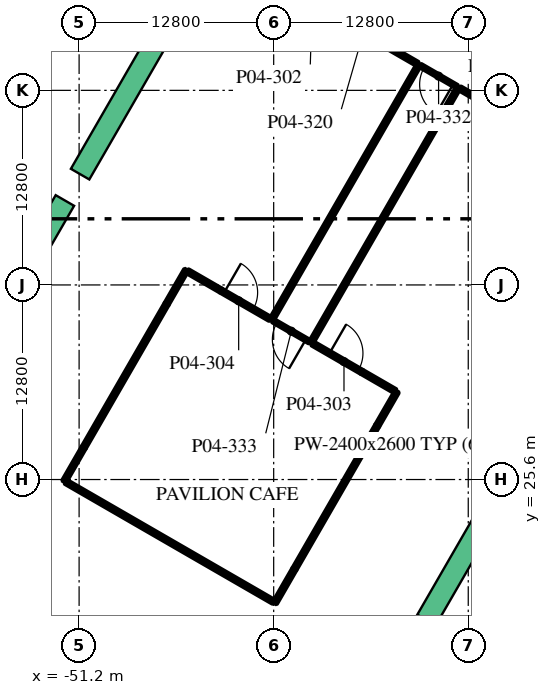
"""IFC4 building model, lengths in metres.
Left out: names, types, materials, properties, quantities, classifications, styles, units other than length and angle.
Written with IfcOpenShell. Run it as: python <this file> out.ifc"""

import sys

from ifc_helpers import new_model, si_unit, direction, frame, frame_2d, origin, place, context, subcontext, project, spatial, rectangle, extrude, element, fill, save


model = new_model("IFC4")
c1 = context("Model", 3, precision=1e-05, world=origin(), true_north=direction((0.0, 1.0)))
c2 = subcontext(c1, "Body", "Model", "MODEL_VIEW")
j1 = project(units=[si_unit("LENGTHUNIT", "METRE"), si_unit("PLANEANGLEUNIT", "RADIAN")], contexts=[c1])
p1 = place(None, origin())
s1 = spatial("IfcSite", under=j1, at=p1, CompositionType="ELEMENT")
p2 = place(p1, origin())
s2 = spatial("IfcBuilding", under=s1, at=p2, CompositionType="ELEMENT")
p3 = place(p2, frame((0.0, 0.0, 21.6)))
s3 = spatial("IfcBuildingStorey", under=s2, at=p3, CompositionType="ELEMENT", Elevation=21.6)
p4 = place(p3, frame((-6.875, 40.198, 0.0), z_axis=(0.0, 0.0, 1.0), x_axis=(-0.500000527961, -0.866025098966, 0.0)))
e1 = element("IfcWall", 1, at=p4, inside=s3, PredefinedType="SOLIDWALL", context=c2, shape_type="SweptSolid", body=[
    extrude(rectangle(XDim=62.75, YDim=0.25, at=frame_2d((31.375, 0.0))), origin(), (0.0, 0.0, 1.0), 4.5),
])
p5 = place(p3, frame((-30.311, 31.356, 0.0), z_axis=(0.0, 0.0, 1.0), x_axis=(-0.499990435942, -0.866030925526, 0.0)))
e2 = element("IfcWall", 2, at=p5, inside=s3, PredefinedType="SOLIDWALL", context=c2, shape_type="SweptSolid", body=[
    extrude(rectangle(XDim=2.55, YDim=0.25, at=frame_2d((1.275, 0.0))), origin(), (0.0, 0.0, 1.0), 4.5),
])
p6 = place(p3, frame((-31.586, 29.148, 0.0), z_axis=(0.0, 0.0, 1.0), x_axis=(-0.499995831264, -0.866027810592, 0.0)))
e3 = element("IfcWall", 3, at=p6, inside=s3, PredefinedType="SOLIDWALL", context=c2, shape_type="SweptSolid", body=[
    extrude(rectangle(XDim=10.9, YDim=0.25, at=frame_2d((5.45, 0.0))), origin(), (0.0, 0.0, 1.0), 4.5),
])
p7 = place(p6, frame((0.25, 0.0, 0.5)))
e4 = element("IfcOpeningElement", 4, at=p7, cuts=e3, PredefinedType="OPENING", context=c2, shape_type="SweptSolid", body=[
    extrude(rectangle(XDim=2.4, YDim=2.6, at=frame_2d((1.2, 1.3))), frame((0.0, 0.135, 0.0), z_axis=(0.0, -1.0, 0.0), x_axis=(1.0, 0.0, 0.0)), (0.0, 0.0, 1.0), 0.27),
])
p8 = place(p6, frame((4.25, 0.0, 0.5)))
e5 = element("IfcOpeningElement", 5, at=p8, cuts=e3, PredefinedType="OPENING", context=c2, shape_type="SweptSolid", body=[
    extrude(rectangle(XDim=2.4, YDim=2.6, at=frame_2d((1.2, 1.3))), frame((0.0, 0.135, 0.0), z_axis=(0.0, -1.0, 0.0), x_axis=(1.0, 0.0, 0.0)), (0.0, 0.0, 1.0), 0.27),
])
p9 = place(p6, frame((8.25, 0.0, 0.5)))
e6 = element("IfcOpeningElement", 6, at=p9, cuts=e3, PredefinedType="OPENING", context=c2, shape_type="SweptSolid", body=[
    extrude(rectangle(XDim=2.4, YDim=2.6, at=frame_2d((1.2, 1.3))), frame((0.0, 0.135, 0.0), z_axis=(0.0, -1.0, 0.0), x_axis=(1.0, 0.0, 0.0)), (0.0, 0.0, 1.0), 0.27),
])
p10 = place(p3, frame((-37.036, 19.708, 0.0), z_axis=(0.0, 0.0, 1.0), x_axis=(-0.500062241894, -0.865989465428, 0.0)))
e7 = element("IfcWall", 7, at=p10, inside=s3, PredefinedType="SOLIDWALL", context=c2, shape_type="SweptSolid", body=[
    extrude(rectangle(XDim=2.55, YDim=0.25, at=frame_2d((1.275, 0.0))), origin(), (0.0, 0.0, 1.0), 4.5),
])
for number, where, z_axis, x_axis in (
    (8, (-26.252, 51.385, 0.0), (0.0, 0.0, 1.0), (-0.5, -0.866, 0.0)),
    (9, (-38.538, 36.106, 0.0), (0.0, 0.0, 1.0), (0.5, 0.866, 0.0)),
):
    element("IfcWall", number, at=place(p3, frame(where, z_axis=z_axis, x_axis=x_axis)), inside=s3, PredefinedType="SOLIDWALL", context=c2, shape_type="SweptSolid", body=[
        extrude(rectangle(XDim=19.375, YDim=0.25, at=frame_2d((9.688, 0.0))), origin(), (0.0, 0.0, 1.0), 4.5),
    ])
p11 = place(p3, frame((-45.442, 37.148, 0.0), z_axis=(0.0, 0.0, 1.0), x_axis=(0.500062241894, 0.865989465428, 0.0)))
e10 = element("IfcWall", 10, at=p11, inside=s3, PredefinedType="SOLIDWALL", context=c2, shape_type="SweptSolid", body=[
    extrude(rectangle(XDim=2.55, YDim=0.25, at=frame_2d((1.275, 0.0))), origin(), (0.0, 0.0, 1.0), 4.5),
])
p12 = place(p3, frame((-50.892, 27.708, 0.0), z_axis=(0.0, 0.0, 1.0), x_axis=(0.499995831264, 0.866027810592, 0.0)))
e11 = element("IfcWall", 11, at=p12, inside=s3, PredefinedType="SOLIDWALL", context=c2, shape_type="SweptSolid", body=[
    extrude(rectangle(XDim=10.9, YDim=0.25, at=frame_2d((5.45, 0.0))), origin(), (0.0, 0.0, 1.0), 4.5),
])
p13 = place(p12, frame((8.25, 0.0, 0.5)))
e12 = element("IfcOpeningElement", 12, at=p13, cuts=e11, PredefinedType="OPENING", context=c2, shape_type="SweptSolid", body=[
    extrude(rectangle(XDim=2.4, YDim=2.6, at=frame_2d((1.2, 1.3))), frame((0.0, 0.135, 0.0), z_axis=(0.0, -1.0, 0.0), x_axis=(1.0, 0.0, 0.0)), (0.0, 0.0, 1.0), 0.27),
])
p14 = place(p12, frame((4.25, 0.0, 0.5)))
e13 = element("IfcOpeningElement", 13, at=p14, cuts=e11, PredefinedType="OPENING", context=c2, shape_type="SweptSolid", body=[
    extrude(rectangle(XDim=2.4, YDim=2.6, at=frame_2d((1.2, 1.3))), frame((0.0, 0.135, 0.0), z_axis=(0.0, -1.0, 0.0), x_axis=(1.0, 0.0, 0.0)), (0.0, 0.0, 1.0), 0.27),
])
p15 = place(p12, frame((0.25, 0.0, 0.5)))
e14 = element("IfcOpeningElement", 14, at=p15, cuts=e11, PredefinedType="OPENING", context=c2, shape_type="SweptSolid", body=[
    extrude(rectangle(XDim=2.4, YDim=2.6, at=frame_2d((1.2, 1.3))), frame((0.0, 0.135, 0.0), z_axis=(0.0, -1.0, 0.0), x_axis=(1.0, 0.0, 0.0)), (0.0, 0.0, 1.0), 0.27),
])
p16 = place(p3, frame((-52.167, 25.5, 0.0), z_axis=(0.0, 0.0, 1.0), x_axis=(0.499990435942, 0.866030925526, 0.0)))
e15 = element("IfcWall", 15, at=p16, inside=s3, PredefinedType="SOLIDWALL", context=c2, shape_type="SweptSolid", body=[
    extrude(rectangle(XDim=2.55, YDim=0.25, at=frame_2d((1.275, 0.0))), origin(), (0.0, 0.0, 1.0), 4.5),
])
p17 = place(p3, frame((-79.603, 9.73, 0.0), z_axis=(0.0, 0.0, 1.0), x_axis=(0.500000527961, 0.866025098966, 0.0)))
e16 = element("IfcWall", 16, at=p17, inside=s3, PredefinedType="SOLIDWALL", context=c2, shape_type="SweptSolid", body=[
    extrude(rectangle(XDim=62.75, YDim=0.25, at=frame_2d((31.375, 0.0))), origin(), (0.0, 0.0, 1.0), 4.5),
])
for number, where, z_axis, x_axis in (
    (17, (-26.144, 51.323, 0.0), (0.0, 0.0, 1.0), (0.866, -0.5, 0.0)),
    (18, (-34.696, 56.26, 0.0), (0.0, 0.0, 1.0), (0.866, -0.5, 0.0)),
):
    element("IfcWall", number, at=place(p3, frame(where, z_axis=z_axis, x_axis=x_axis)), inside=s3, PredefinedType="SOLIDWALL", context=c2, shape_type="SweptSolid", body=[
        extrude(rectangle(XDim=6.625, YDim=0.25, at=frame_2d((3.312, 0.0))), origin(), (0.0, 0.0, 1.0), 4.5),
    ])
p18 = place(p3, frame((-32.606, 32.681, 0.0), z_axis=(0.0, 0.0, 1.0), x_axis=(0.865997200291, -0.500048846702, 0.0)))
e19 = element("IfcWall", 19, at=p18, inside=s3, PredefinedType="SOLIDWALL", context=c2, shape_type="SweptSolid", body=[
    extrude(rectangle(XDim=2.525, YDim=0.25, at=frame_2d((1.263, 0.0))), origin(), (0.0, 0.0, 1.0), 4.5),
])
p19 = place(p3, frame((-35.832, 34.544, 0.0), z_axis=(0.0, 0.0, 1.0), x_axis=(0.866040420308, -0.499973989716, 0.0)))
e20 = element("IfcWall", 20, at=p19, inside=s3, PredefinedType="SOLIDWALL", context=c2, shape_type="SweptSolid", body=[
    extrude(rectangle(XDim=3.725, YDim=0.25, at=frame_2d((1.862, 0.0))), origin(), (0.0, 0.0, 1.0), 4.5),
])
p20 = place(p19, frame((1.275, 0.0, 0.0)))
e21 = element("IfcOpeningElement", 21, at=p20, cuts=e20, PredefinedType="OPENING", context=c2, shape_type="SweptSolid", body=[
    extrude(rectangle(XDim=2.2, YDim=2.1, at=frame_2d((1.1, 1.05))), frame((0.0, 0.135, 0.0), z_axis=(0.0, -1.0, 0.0), x_axis=(1.0, 0.0, 0.0)), (0.0, 0.0, 1.0), 0.27),
])
p21 = place(p3, frame((-41.872, 38.031, 0.0), z_axis=(0.0, 0.0, 1.0), x_axis=(0.866012039196, -0.500023147432, 0.0)))
e22 = element("IfcWall", 22, at=p21, inside=s3, PredefinedType="SOLIDWALL", context=c2, shape_type="SweptSolid", body=[
    extrude(rectangle(XDim=3.725, YDim=0.25, at=frame_2d((1.862, 0.0))), origin(), (0.0, 0.0, 1.0), 4.5),
])
p22 = place(p21, frame((0.25, 0.0, 0.0)))
e23 = element("IfcOpeningElement", 23, at=p22, cuts=e22, PredefinedType="OPENING", context=c2, shape_type="SweptSolid", body=[
    extrude(rectangle(XDim=2.2, YDim=2.1, at=frame_2d((1.1, 1.05))), frame((0.0, 0.135, 0.0), z_axis=(0.0, -1.0, 0.0), x_axis=(1.0, 0.0, 0.0)), (0.0, 0.0, 1.0), 0.27),
])
p23 = place(p3, frame((-44.059, 39.294, 0.0), z_axis=(0.0, 0.0, 1.0), x_axis=(0.866039067339, -0.499976333282, 0.0)))
e24 = element("IfcWall", 24, at=p23, inside=s3, PredefinedType="SOLIDWALL", context=c2, shape_type="SweptSolid", body=[
    extrude(rectangle(XDim=2.525, YDim=0.25, at=frame_2d((1.262, 0.0))), origin(), (0.0, 0.0, 1.0), 4.5),
])
p24 = place(p3, frame((-38.419, 17.562, 0.0), z_axis=(0.0, 0.0, 1.0), x_axis=(-0.866025284237, 0.500000207062, 0.0)))
e25 = element("IfcWall", 25, at=p24, inside=s3, PredefinedType="SOLIDWALL", context=c2, shape_type="SweptSolid", body=[
    extrude(rectangle(XDim=15.75, YDim=0.25, at=frame_2d((7.875, 0.0))), origin(), (0.0, 0.0, 1.0), 4.5),
])
p25 = place(p3, frame((-26.361, 51.448, 0.0), z_axis=(0.0, 0.0, 1.0), x_axis=(-0.866027397988, 0.499996545922, 0.0)))
e26 = element("IfcWall", 26, at=p25, inside=s3, PredefinedType="PARTITIONING", context=c2, shape_type="SweptSolid", body=[
    extrude(rectangle(XDim=2.75, YDim=0.2, at=frame_2d((1.375, 0.0))), origin(), (0.0, 0.0, 1.0), 4.5),
])
p26 = place(p25, frame((0.275, 0.0, 0.0)))
e27 = element("IfcOpeningElement", 27, at=p26, cuts=e26, PredefinedType="OPENING", context=c2, shape_type="SweptSolid", body=[
    extrude(rectangle(XDim=2.2, YDim=2.1, at=frame_2d((1.1, 1.05))), frame((0.0, 0.11, 0.0), z_axis=(0.0, -1.0, 0.0), x_axis=(1.0, 0.0, 0.0)), (0.0, 0.0, 1.0), 0.22),
])
p27 = place(p3, frame((-36.048, 34.669, 0.0), z_axis=(0.0, 0.0, 1.0), x_axis=(-0.866027397988, 0.499996545922, 0.0)))
e28 = element("IfcWall", 28, at=p27, inside=s3, PredefinedType="PARTITIONING", context=c2, shape_type="SweptSolid", body=[
    extrude(rectangle(XDim=2.75, YDim=0.2, at=frame_2d((1.375, 0.0))), origin(), (0.0, 0.0, 1.0), 4.5),
])
p28 = place(p27, frame((0.275, 0.0, 0.0)))
e29 = element("IfcOpeningElement", 29, at=p28, cuts=e28, PredefinedType="OPENING", context=c2, shape_type="SweptSolid", body=[
    extrude(rectangle(XDim=2.2, YDim=2.1, at=frame_2d((1.1, 1.05))), frame((0.0, 0.11, 0.0), z_axis=(0.0, -1.0, 0.0), x_axis=(1.0, 0.0, 0.0)), (0.0, 0.0, 1.0), 0.22),
])
for number, where, z_axis, x_axis in (
    (30, (-22.343, 26.756, 0.0), (0.0, 0.0, 1.0), (-0.5, -0.866, 0.0)),
    (31, (-45.135, 56.081, 0.0), (0.0, 0.0, 1.0), (-0.5, -0.866, 0.0)),
    (32, (-52.135, 43.956, 0.0), (0.0, 0.0, 1.0), (-0.5, -0.866, 0.0)),
):
    element("IfcWall", number, at=place(p3, frame(where, z_axis=z_axis, x_axis=x_axis)), inside=s3, PredefinedType="SOLIDWALL", context=c2, shape_type="SweptSolid", body=[
        extrude(rectangle(XDim=12.0, YDim=1.4, at=frame_2d((6.0, 0.0))), origin(), (0.0, 0.0, 1.0), 0.9),
    ])
p29 = place(p7, origin())
e33 = element("IfcWindow", 33, at=p29, inside=s3, PartitioningType="SINGLE_PANEL", PredefinedType="WINDOW", context=c2, shape_type="SweptSolid", body=[
    extrude(rectangle(XDim=2.4, YDim=2.6, at=frame_2d((1.2, 1.3))), frame((0.0, 0.03, 0.0), z_axis=(0.0, -1.0, 0.0), x_axis=(1.0, 0.0, 0.0)), (0.0, 0.0, 1.0), 0.06),
])
fill(e4, e33)
p30 = place(p8, origin())
e34 = element("IfcWindow", 34, at=p30, inside=s3, PartitioningType="SINGLE_PANEL", PredefinedType="WINDOW", context=c2, shape_type="SweptSolid", body=[
    extrude(rectangle(XDim=2.4, YDim=2.6, at=frame_2d((1.2, 1.3))), frame((0.0, 0.03, 0.0), z_axis=(0.0, -1.0, 0.0), x_axis=(1.0, 0.0, 0.0)), (0.0, 0.0, 1.0), 0.06),
])
fill(e5, e34)
p31 = place(p9, origin())
e35 = element("IfcWindow", 35, at=p31, inside=s3, PartitioningType="SINGLE_PANEL", PredefinedType="WINDOW", context=c2, shape_type="SweptSolid", body=[
    extrude(rectangle(XDim=2.4, YDim=2.6, at=frame_2d((1.2, 1.3))), frame((0.0, 0.03, 0.0), z_axis=(0.0, -1.0, 0.0), x_axis=(1.0, 0.0, 0.0)), (0.0, 0.0, 1.0), 0.06),
])
fill(e6, e35)
p32 = place(p13, origin())
e36 = element("IfcWindow", 36, at=p32, inside=s3, PartitioningType="SINGLE_PANEL", PredefinedType="WINDOW", context=c2, shape_type="SweptSolid", body=[
    extrude(rectangle(XDim=2.4, YDim=2.6, at=frame_2d((1.2, 1.3))), frame((0.0, 0.03, 0.0), z_axis=(0.0, -1.0, 0.0), x_axis=(1.0, 0.0, 0.0)), (0.0, 0.0, 1.0), 0.06),
])
fill(e12, e36)
p33 = place(p14, origin())
e37 = element("IfcWindow", 37, at=p33, inside=s3, PartitioningType="SINGLE_PANEL", PredefinedType="WINDOW", context=c2, shape_type="SweptSolid", body=[
    extrude(rectangle(XDim=2.4, YDim=2.6, at=frame_2d((1.2, 1.3))), frame((0.0, 0.03, 0.0), z_axis=(0.0, -1.0, 0.0), x_axis=(1.0, 0.0, 0.0)), (0.0, 0.0, 1.0), 0.06),
])
fill(e13, e37)
p34 = place(p15, origin())
e38 = element("IfcWindow", 38, at=p34, inside=s3, PartitioningType="SINGLE_PANEL", PredefinedType="WINDOW", context=c2, shape_type="SweptSolid", body=[
    extrude(rectangle(XDim=2.4, YDim=2.6, at=frame_2d((1.2, 1.3))), frame((0.0, 0.03, 0.0), z_axis=(0.0, -1.0, 0.0), x_axis=(1.0, 0.0, 0.0)), (0.0, 0.0, 1.0), 0.06),
])
fill(e14, e38)
p35 = place(p20, origin())
e39 = element("IfcDoor", 39, at=p35, inside=s3, OperationType="DOUBLE_DOOR_SINGLE_SWING", PredefinedType="DOOR", context=c2, shape_type="SweptSolid", body=[
    extrude(rectangle(XDim=2.2, YDim=2.1, at=frame_2d((1.1, 1.05))), frame((0.0, 0.025, 0.0), z_axis=(0.0, -1.0, 0.0), x_axis=(1.0, 0.0, 0.0)), (0.0, 0.0, 1.0), 0.05),
])
fill(e21, e39)
p36 = place(p22, origin())
e40 = element("IfcDoor", 40, at=p36, inside=s3, OperationType="DOUBLE_DOOR_SINGLE_SWING", PredefinedType="DOOR", context=c2, shape_type="SweptSolid", body=[
    extrude(rectangle(XDim=2.2, YDim=2.1, at=frame_2d((1.1, 1.05))), frame((0.0, 0.025, 0.0), z_axis=(0.0, -1.0, 0.0), x_axis=(1.0, 0.0, 0.0)), (0.0, 0.0, 1.0), 0.05),
])
fill(e23, e40)
p37 = place(p26, origin())
e41 = element("IfcDoor", 41, at=p37, inside=s3, OperationType="DOUBLE_DOOR_SINGLE_SWING", PredefinedType="DOOR", context=c2, shape_type="SweptSolid", body=[
    extrude(rectangle(XDim=2.2, YDim=2.1, at=frame_2d((1.1, 1.05))), frame((0.0, 0.025, 0.0), z_axis=(0.0, -1.0, 0.0), x_axis=(1.0, 0.0, 0.0)), (0.0, 0.0, 1.0), 0.05),
])
fill(e27, e41)
p38 = place(p28, origin())
e42 = element("IfcDoor", 42, at=p38, inside=s3, OperationType="DOUBLE_DOOR_SINGLE_SWING", PredefinedType="DOOR", context=c2, shape_type="SweptSolid", body=[
    extrude(rectangle(XDim=2.2, YDim=2.1, at=frame_2d((1.1, 1.05))), frame((0.0, 0.025, 0.0), z_axis=(0.0, -1.0, 0.0), x_axis=(1.0, 0.0, 0.0)), (0.0, 0.0, 1.0), 0.05),
])
fill(e29, e42)
save(model, sys.argv[1])
